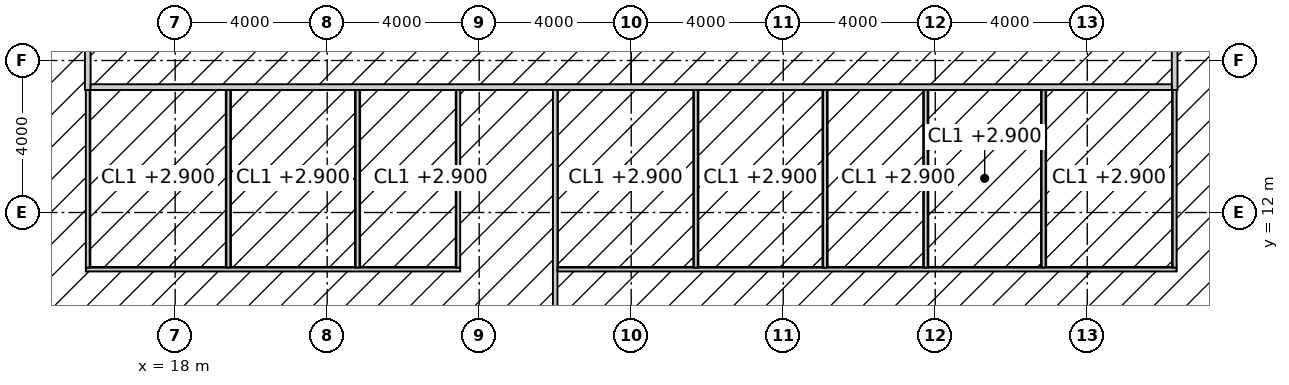
"""IFC4 building model, lengths in metres.
Left out: names, types, materials, properties, quantities, classifications, styles, units other than length and angle.
Written with IfcOpenShell. Run it as: python <this file> out.ifc"""

import sys

from ifc_helpers import new_model, si_unit, direction, frame, frame_2d, origin, place, context, subcontext, project, spatial, rectangle, extrude, element, fill, save


model = new_model("IFC4")
c1 = context("Model", 3, precision=1e-05, world=origin(), true_north=direction((0.0, 1.0)))
c2 = subcontext(c1, "Body", "Model", "MODEL_VIEW")
j1 = project(units=[si_unit("LENGTHUNIT", "METRE"), si_unit("PLANEANGLEUNIT", "RADIAN")], contexts=[c1])
p1 = place(None, origin())
s1 = spatial("IfcSite", under=j1, at=p1, CompositionType="ELEMENT")
p2 = place(p1, origin())
s2 = spatial("IfcBuilding", under=s1, at=p2, CompositionType="ELEMENT")
p3 = place(p2, frame((0.0, 0.0, 19.0)))
s3 = spatial("IfcBuildingStorey", under=s2, at=p3, CompositionType="ELEMENT", Elevation=19.0)
p4 = place(p3, frame((15.7, 15.225, 0.0), z_axis=(0.0, 0.0, 1.0), x_axis=(0.0, 1.0, 0.0)))
e1 = element("IfcWall", 1, at=p4, inside=s3, PredefinedType="PARTITIONING", context=c2, shape_type="SweptSolid", body=[
    extrude(rectangle(XDim=23.55, YDim=0.15, at=frame_2d((11.775, 0.0))), origin(), (0.0, 0.0, 1.0), 3.85),
])
p5 = place(p4, frame((5.175, 0.0, 0.0)))
e2 = element("IfcOpeningElement", 2, at=p5, cuts=e1, PredefinedType="OPENING", context=c2, shape_type="SweptSolid", body=[
    extrude(rectangle(XDim=1.8, YDim=2.4, at=frame_2d((0.9, 1.2))), frame((0.0, 0.085, 0.0), z_axis=(0.0, -1.0, 0.0), x_axis=(1.0, 0.0, 0.0)), (0.0, 0.0, 1.0), 0.17),
])
p6 = place(p4, frame((16.825, 0.0, 0.0)))
e3 = element("IfcOpeningElement", 3, at=p6, cuts=e1, PredefinedType="OPENING", context=c2, shape_type="SweptSolid", body=[
    extrude(rectangle(XDim=1.8, YDim=2.4, at=frame_2d((0.9, 1.2))), frame((0.0, 0.085, 0.0), z_axis=(0.0, -1.0, 0.0), x_axis=(1.0, 0.0, 0.0)), (0.0, 0.0, 1.0), 0.17),
])
p7 = place(p3, frame((44.3, 15.225, 0.0), z_axis=(0.0, 0.0, 1.0), x_axis=(0.0, 1.0, 0.0)))
e4 = element("IfcWall", 4, at=p7, inside=s3, PredefinedType="PARTITIONING", context=c2, shape_type="SweptSolid", body=[
    extrude(rectangle(XDim=23.55, YDim=0.15, at=frame_2d((11.775, 0.0))), origin(), (0.0, 0.0, 1.0), 3.85),
])
p8 = place(p7, frame((5.575, 0.0, 0.0)))
e5 = element("IfcOpeningElement", 5, at=p8, cuts=e4, PredefinedType="OPENING", context=c2, shape_type="SweptSolid", body=[
    extrude(rectangle(XDim=1.8, YDim=2.4, at=frame_2d((0.9, 1.2))), frame((0.0, 0.085, 0.0), z_axis=(0.0, -1.0, 0.0), x_axis=(1.0, 0.0, 0.0)), (0.0, 0.0, 1.0), 0.17),
])
p9 = place(p7, frame((16.825, 0.0, 0.0)))
e6 = element("IfcOpeningElement", 6, at=p9, cuts=e4, PredefinedType="OPENING", context=c2, shape_type="SweptSolid", body=[
    extrude(rectangle(XDim=1.8, YDim=2.4, at=frame_2d((0.9, 1.2))), frame((0.0, 0.085, 0.0), z_axis=(0.0, -1.0, 0.0), x_axis=(1.0, 0.0, 0.0)), (0.0, 0.0, 1.0), 0.17),
])
p10 = place(p3, frame((15.775, 15.3, 0.0), z_axis=(0.0, 0.0, 1.0), x_axis=(1.0, 0.0, 0.0)))
e7 = element("IfcWall", 7, at=p10, inside=s3, PredefinedType="PARTITIONING", context=c2, shape_type="SweptSolid", body=[
    extrude(rectangle(XDim=28.45, YDim=0.15, at=frame_2d((14.225, 0.0))), origin(), (0.0, 0.0, 1.0), 3.85),
])
p11 = place(p3, frame((28.0, -3.7, 0.0), z_axis=(0.0, 0.0, 1.0), x_axis=(0.0, 1.0, 0.0)))
e8 = element("IfcWall", 8, at=p11, inside=s3, PredefinedType="PARTITIONING", context=c2, shape_type="SweptSolid", body=[
    extrude(rectangle(XDim=18.925, YDim=0.12, at=frame_2d((9.462, 0.0))), origin(), (0.0, 0.0, 1.0), 3.85),
])
p12 = place(p3, frame((15.65, 10.5, 0.0), z_axis=(0.0, 0.0, 1.0), x_axis=(1.0, 0.0, 0.0)))
e9 = element("IfcWall", 9, at=p12, inside=s3, PredefinedType="PARTITIONING", context=c2, shape_type="SweptSolid", body=[
    extrude(rectangle(XDim=9.85, YDim=0.1, at=frame_2d((4.925, 0.0))), origin(), (0.0, 0.0, 1.0), 3.85),
])
p13 = place(p12, frame((1.4, 0.0, 0.0)))
e10 = element("IfcOpeningElement", 10, at=p13, cuts=e9, PredefinedType="OPENING", context=c2, shape_type="SweptSolid", body=[
    extrude(rectangle(XDim=1.0, YDim=2.2, at=frame_2d((0.5, 1.1))), frame((0.0, 0.06, 0.0), z_axis=(0.0, -1.0, 0.0), x_axis=(1.0, 0.0, 0.0)), (0.0, 0.0, 1.0), 0.12),
])
p14 = place(p12, frame((4.95, 0.0, 0.0)))
e11 = element("IfcOpeningElement", 11, at=p14, cuts=e9, PredefinedType="OPENING", context=c2, shape_type="SweptSolid", body=[
    extrude(rectangle(XDim=1.0, YDim=2.2, at=frame_2d((0.5, 1.1))), frame((0.0, 0.06, 0.0), z_axis=(0.0, -1.0, 0.0), x_axis=(1.0, 0.0, 0.0)), (0.0, 0.0, 1.0), 0.12),
])
p15 = place(p12, frame((7.975, 0.0, 0.0)))
e12 = element("IfcOpeningElement", 12, at=p15, cuts=e9, PredefinedType="OPENING", context=c2, shape_type="SweptSolid", body=[
    extrude(rectangle(XDim=1.0, YDim=2.2, at=frame_2d((0.5, 1.1))), frame((0.0, 0.06, 0.0), z_axis=(0.0, -1.0, 0.0), x_axis=(1.0, 0.0, 0.0)), (0.0, 0.0, 1.0), 0.12),
])
p16 = place(p3, frame((28.061, 10.5, 0.0), z_axis=(0.0, 0.0, 1.0), x_axis=(1.0, 0.0, 0.0)))
e13 = element("IfcWall", 13, at=p16, inside=s3, PredefinedType="PARTITIONING", context=c2, shape_type="SweptSolid", body=[
    extrude(rectangle(XDim=16.289, YDim=0.1, at=frame_2d((8.145, 0.0))), origin(), (0.0, 0.0, 1.0), 3.85),
])
p17 = place(p16, frame((1.29, 0.0, 0.0)))
e14 = element("IfcOpeningElement", 14, at=p17, cuts=e13, PredefinedType="OPENING", context=c2, shape_type="SweptSolid", body=[
    extrude(rectangle(XDim=1.0, YDim=2.2, at=frame_2d((0.5, 1.1))), frame((0.0, 0.06, 0.0), z_axis=(0.0, -1.0, 0.0), x_axis=(1.0, 0.0, 0.0)), (0.0, 0.0, 1.0), 0.12),
])
p18 = place(p16, frame((4.84, 0.0, 0.0)))
e15 = element("IfcOpeningElement", 15, at=p18, cuts=e13, PredefinedType="OPENING", context=c2, shape_type="SweptSolid", body=[
    extrude(rectangle(XDim=1.0, YDim=2.2, at=frame_2d((0.5, 1.1))), frame((0.0, 0.06, 0.0), z_axis=(0.0, -1.0, 0.0), x_axis=(1.0, 0.0, 0.0)), (0.0, 0.0, 1.0), 0.12),
])
p19 = place(p16, frame((7.865, 0.0, 0.0)))
e16 = element("IfcOpeningElement", 16, at=p19, cuts=e13, PredefinedType="OPENING", context=c2, shape_type="SweptSolid", body=[
    extrude(rectangle(XDim=1.0, YDim=2.2, at=frame_2d((0.5, 1.1))), frame((0.0, 0.06, 0.0), z_axis=(0.0, -1.0, 0.0), x_axis=(1.0, 0.0, 0.0)), (0.0, 0.0, 1.0), 0.12),
])
p20 = place(p16, frame((10.74, 0.0, 0.0)))
e17 = element("IfcOpeningElement", 17, at=p20, cuts=e13, PredefinedType="OPENING", context=c2, shape_type="SweptSolid", body=[
    extrude(rectangle(XDim=1.0, YDim=2.2, at=frame_2d((0.5, 1.1))), frame((0.0, 0.06, 0.0), z_axis=(0.0, -1.0, 0.0), x_axis=(1.0, 0.0, 0.0)), (0.0, 0.0, 1.0), 0.12),
])
p21 = place(p16, frame((14.014, 0.0, 0.0)))
e18 = element("IfcOpeningElement", 18, at=p21, cuts=e13, PredefinedType="OPENING", context=c2, shape_type="SweptSolid", body=[
    extrude(rectangle(XDim=1.0, YDim=2.2, at=frame_2d((0.5, 1.1))), frame((0.0, 0.06, 0.0), z_axis=(0.0, -1.0, 0.0), x_axis=(1.0, 0.0, 0.0)), (0.0, 0.0, 1.0), 0.12),
])
for number, where, z_axis, x_axis in (
    (19, (15.7, 10.55, 0.0), (0.0, 0.0, 1.0), (0.0, 1.0, 0.0)),
    (20, (19.4, 10.55, 0.0), (0.0, 0.0, 1.0), (0.0, 1.0, 0.0)),
    (21, (22.8, 10.55, 0.0), (0.0, 0.0, 1.0), (0.0, 1.0, 0.0)),
    (22, (25.45, 10.55, 0.0), (0.0, 0.0, 1.0), (0.0, 1.0, 0.0)),
    (23, (31.701, 10.55, 0.0), (0.0, 0.0, 1.0), (0.0, 1.0, 0.0)),
    (24, (35.101, 10.55, 0.0), (0.0, 0.0, 1.0), (0.0, 1.0, 0.0)),
    (25, (37.751, 10.55, 0.0), (0.0, 0.0, 1.0), (0.0, 1.0, 0.0)),
    (26, (40.851, 10.55, 0.0), (0.0, 0.0, 1.0), (0.0, 1.0, 0.0)),
    (27, (44.3, 10.55, 0.0), (0.0, 0.0, 1.0), (0.0, 1.0, 0.0)),
):
    element("IfcWall", number, at=place(p3, frame(where, z_axis=z_axis, x_axis=x_axis)), inside=s3, PredefinedType="PARTITIONING", context=c2, shape_type="SweptSolid", body=[
        extrude(rectangle(XDim=4.675, YDim=0.1, at=frame_2d((2.337, 0.0))), origin(), (0.0, 0.0, 1.0), 3.85),
    ])
p22 = place(p13, origin())
e28 = element("IfcDoor", 28, at=p22, inside=s3, OperationType="SINGLE_SWING_RIGHT", PredefinedType="DOOR", context=c2, shape_type="SweptSolid", body=[
    extrude(rectangle(XDim=1.0, YDim=2.2, at=frame_2d((0.5, 1.1))), frame((0.0, 0.025, 0.0), z_axis=(0.0, -1.0, 0.0), x_axis=(1.0, 0.0, 0.0)), (0.0, 0.0, 1.0), 0.05),
])
fill(e10, e28)
p23 = place(p14, origin())
e29 = element("IfcDoor", 29, at=p23, inside=s3, OperationType="SINGLE_SWING_LEFT", PredefinedType="DOOR", context=c2, shape_type="SweptSolid", body=[
    extrude(rectangle(XDim=1.0, YDim=2.2, at=frame_2d((0.5, 1.1))), frame((0.0, 0.025, 0.0), z_axis=(0.0, -1.0, 0.0), x_axis=(1.0, 0.0, 0.0)), (0.0, 0.0, 1.0), 0.05),
])
fill(e11, e29)
p24 = place(p15, origin())
e30 = element("IfcDoor", 30, at=p24, inside=s3, OperationType="SINGLE_SWING_LEFT", PredefinedType="DOOR", context=c2, shape_type="SweptSolid", body=[
    extrude(rectangle(XDim=1.0, YDim=2.2, at=frame_2d((0.5, 1.1))), frame((0.0, 0.025, 0.0), z_axis=(0.0, -1.0, 0.0), x_axis=(1.0, 0.0, 0.0)), (0.0, 0.0, 1.0), 0.05),
])
fill(e12, e30)
p25 = place(p17, origin())
e31 = element("IfcDoor", 31, at=p25, inside=s3, OperationType="SINGLE_SWING_RIGHT", PredefinedType="DOOR", context=c2, shape_type="SweptSolid", body=[
    extrude(rectangle(XDim=1.0, YDim=2.2, at=frame_2d((0.5, 1.1))), frame((0.0, 0.025, 0.0), z_axis=(0.0, -1.0, 0.0), x_axis=(1.0, 0.0, 0.0)), (0.0, 0.0, 1.0), 0.05),
])
fill(e14, e31)
p26 = place(p18, origin())
e32 = element("IfcDoor", 32, at=p26, inside=s3, OperationType="SINGLE_SWING_LEFT", PredefinedType="DOOR", context=c2, shape_type="SweptSolid", body=[
    extrude(rectangle(XDim=1.0, YDim=2.2, at=frame_2d((0.5, 1.1))), frame((0.0, 0.025, 0.0), z_axis=(0.0, -1.0, 0.0), x_axis=(1.0, 0.0, 0.0)), (0.0, 0.0, 1.0), 0.05),
])
fill(e15, e32)
p27 = place(p19, origin())
e33 = element("IfcDoor", 33, at=p27, inside=s3, OperationType="SINGLE_SWING_LEFT", PredefinedType="DOOR", context=c2, shape_type="SweptSolid", body=[
    extrude(rectangle(XDim=1.0, YDim=2.2, at=frame_2d((0.5, 1.1))), frame((0.0, 0.025, 0.0), z_axis=(0.0, -1.0, 0.0), x_axis=(1.0, 0.0, 0.0)), (0.0, 0.0, 1.0), 0.05),
])
fill(e16, e33)
p28 = place(p20, origin())
e34 = element("IfcDoor", 34, at=p28, inside=s3, OperationType="SINGLE_SWING_LEFT", PredefinedType="DOOR", context=c2, shape_type="SweptSolid", body=[
    extrude(rectangle(XDim=1.0, YDim=2.2, at=frame_2d((0.5, 1.1))), frame((0.0, 0.025, 0.0), z_axis=(0.0, -1.0, 0.0), x_axis=(1.0, 0.0, 0.0)), (0.0, 0.0, 1.0), 0.05),
])
fill(e17, e34)
p29 = place(p21, origin())
e35 = element("IfcDoor", 35, at=p29, inside=s3, OperationType="SINGLE_SWING_LEFT", PredefinedType="DOOR", context=c2, shape_type="SweptSolid", body=[
    extrude(rectangle(XDim=1.0, YDim=2.2, at=frame_2d((0.5, 1.1))), frame((0.0, 0.025, 0.0), z_axis=(0.0, -1.0, 0.0), x_axis=(1.0, 0.0, 0.0)), (0.0, 0.0, 1.0), 0.05),
])
fill(e18, e35)
save(model, sys.argv[1])
